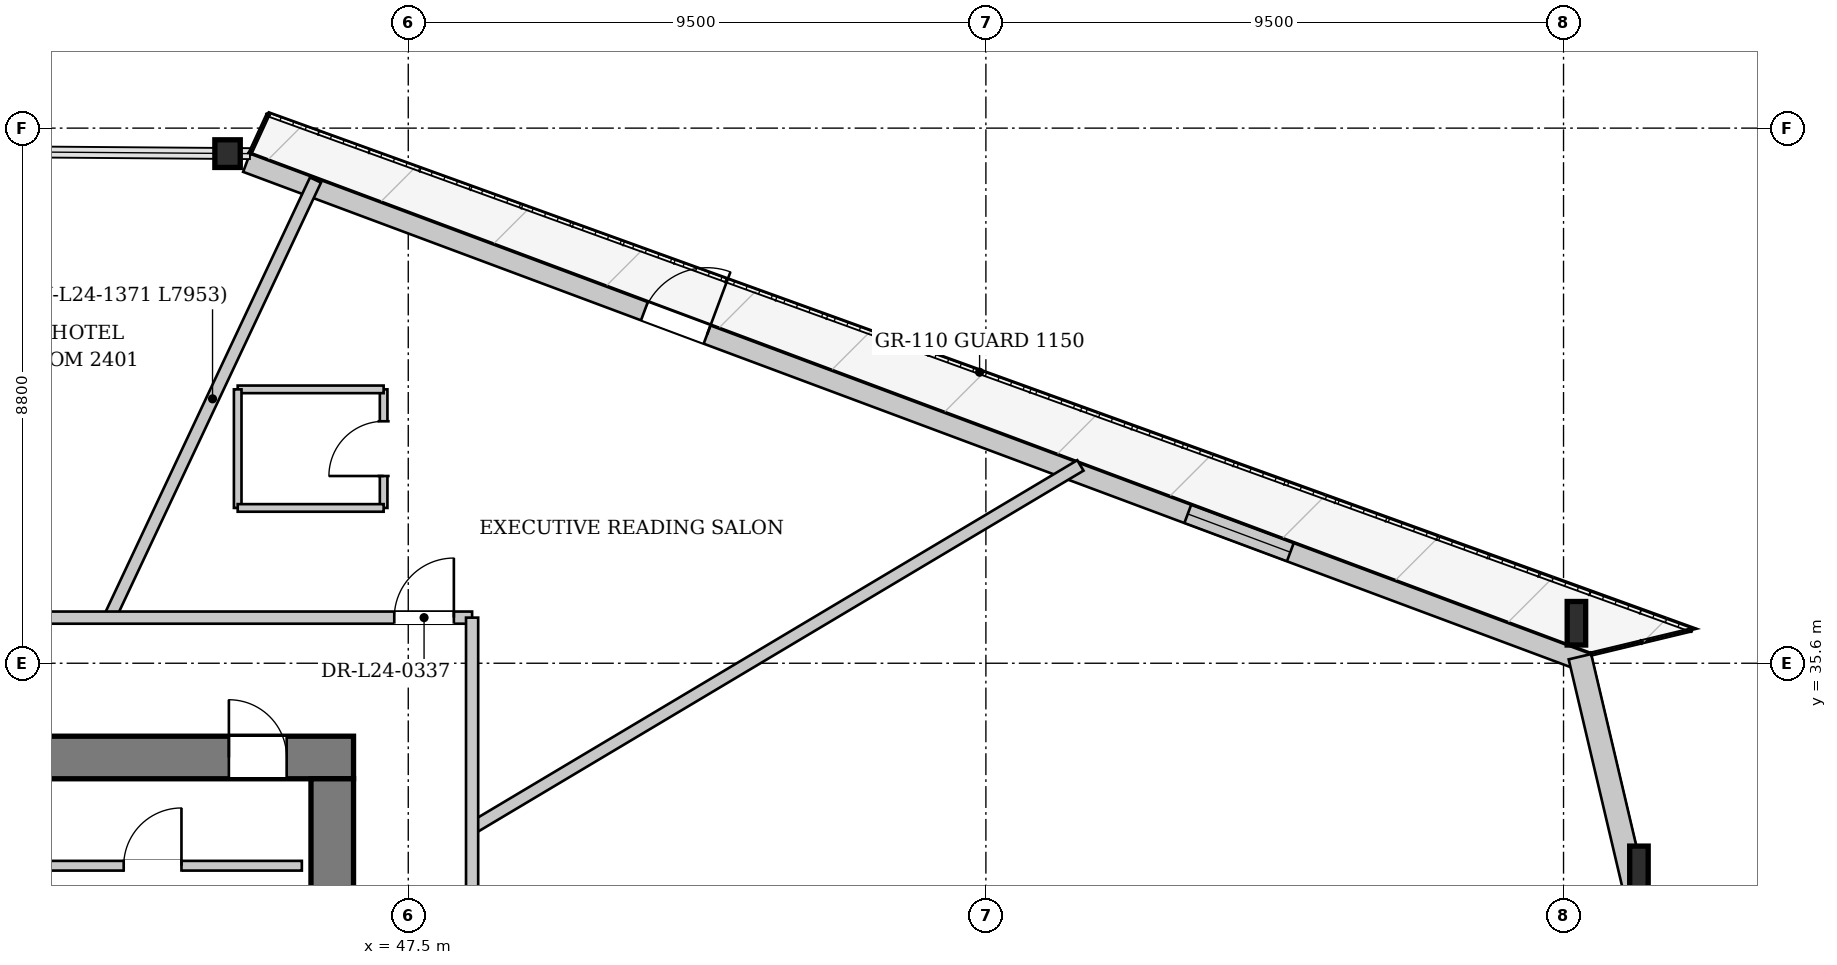
"""IFC4 building model, lengths in metres.
Left out: names, types, materials, properties, quantities, classifications, styles, units other than length and angle.
Written with IfcOpenShell. Run it as: python <this file> out.ifc"""

import sys

from ifc_helpers import new_model, si_unit, direction, frame, frame_2d, origin, origin_2d, place, context, subcontext, project, spatial, rectangle, i_section, extrude, source, transform, mapped, element, fill, save


model = new_model("IFC4")
c1 = context("Model", 3, precision=1e-05, world=origin(), true_north=direction((0.0, 1.0)))
c2 = subcontext(c1, "Body", "Model", "MODEL_VIEW")
j1 = project(units=[si_unit("LENGTHUNIT", "METRE"), si_unit("PLANEANGLEUNIT", "RADIAN")], contexts=[c1])
p1 = place(None, origin())
s1 = spatial("IfcSite", under=j1, at=p1, CompositionType="ELEMENT")
p2 = place(p1, origin())
s2 = spatial("IfcBuilding", under=s1, at=p2, CompositionType="ELEMENT")
p3 = place(p2, frame((0.0, 0.0, 95.05)))
s3 = spatial("IfcBuildingStorey", under=s2, at=p3, CompositionType="ELEMENT", Elevation=95.05)
m1 = source(origin(), c2, "Body", "SweptSolid", [
    extrude(i_section(OverallWidth=0.304, OverallDepth=0.716, WebThickness=0.021, FlangeThickness=0.04, at=origin_2d()), origin(), (0.0, 0.0, 1.0), 3.597),
])
p4 = place(p3, frame((67.919, 31.653, 0.0), z_axis=(-0.099696735978, 0.323454488545, 0.940977021332), x_axis=(-0.955635828254, -0.294550782985, 0.0)))
e1 = element("IfcColumn", 1, at=p4, inside=s3, PredefinedType="COLUMN", context=c2, shape_type="MappedRepresentation", body=[
    mapped(m1, transform((0.0, 0.0, 0.0), x_axis=(1.0, 0.0, 0.0), y_axis=(0.0, 1.0, 0.0), z_axis=(0.0, 0.0, 1.0), scale=1.0)),
])
m2 = source(origin(), c2, "Body", "SweptSolid", [
    extrude(i_section(OverallWidth=0.304, OverallDepth=0.716, WebThickness=0.021, FlangeThickness=0.04, at=origin_2d()), origin(), (0.0, 0.0, 1.0), 3.566),
])
p5 = place(p3, frame((66.954, 35.751, 0.0), z_axis=(-0.135884769408, 0.284023127593, 0.949139711757), x_axis=(-0.902075342607, -0.431578586424, 0.0)))
e2 = element("IfcColumn", 2, at=p5, inside=s3, PredefinedType="COLUMN", context=c2, shape_type="MappedRepresentation", body=[
    mapped(m2, transform((0.0, 0.0, 0.0), x_axis=(1.0, 0.0, 0.0), y_axis=(0.0, 1.0, 0.0), z_axis=(0.0, 0.0, 1.0), scale=1.0)),
])
m3 = source(origin(), c2, "Body", "SweptSolid", [
    extrude(i_section(OverallWidth=0.418, OverallDepth=0.455, WebThickness=0.038, FlangeThickness=0.059, at=origin_2d()), origin(), (0.0, 0.0, 1.0), 3.464),
])
p6 = place(p3, frame((44.896, 43.98, 0.0), z_axis=(-0.212555455601, 7.0475947e-05, 0.977149002623), x_axis=(-0.000331564969, -0.999999945032, 0.0)))
e3 = element("IfcColumn", 3, at=p6, inside=s3, PredefinedType="COLUMN", context=c2, shape_type="MappedRepresentation", body=[
    mapped(m3, transform((0.0, 0.0, 0.0), x_axis=(1.0, 0.0, 0.0), y_axis=(0.0, 1.0, 0.0), z_axis=(0.0, 0.0, 1.0), scale=1.0)),
])
p7 = place(p3, frame((44.84, 43.831, 0.0), z_axis=(0.0, 0.0, 1.0), x_axis=(0.936918509678, -0.349547859704, 0.0)))
e4 = element("IfcWall", 4, at=p7, inside=s3, PredefinedType="SOLIDWALL", context=c2, shape_type="SweptSolid", body=[
    extrude(rectangle(XDim=23.543, YDim=0.32, at=frame_2d((11.771, 0.0))), origin(), (0.0, 0.0, 1.0), 2.692),
])
p8 = place(p7, frame((6.984, 0.0, 0.0)))
e5 = element("IfcOpeningElement", 5, at=p8, cuts=e4, PredefinedType="OPENING", context=c2, shape_type="SweptSolid", body=[
    extrude(rectangle(XDim=1.1, YDim=2.3, at=frame_2d((0.55, 1.15))), frame((0.0, 0.17, 0.0), z_axis=(0.0, -1.0, 0.0), x_axis=(1.0, 0.0, 0.0)), (0.0, 0.0, 1.0), 0.34),
])
p9 = place(p7, frame((16.522, 0.0, 0.372)))
e6 = element("IfcOpeningElement", 6, at=p9, cuts=e4, PredefinedType="OPENING", context=c2, shape_type="SweptSolid", body=[
    extrude(rectangle(XDim=1.8, YDim=2.2, at=frame_2d((0.9, 1.1))), frame((0.0, 0.17, 0.0), z_axis=(0.0, -1.0, 0.0), x_axis=(1.0, 0.0, 0.0)), (0.0, 0.0, 1.0), 0.34),
])
p10 = place(p3, frame((66.77, 35.708, 0.0), z_axis=(0.0, 0.0, 1.0), x_axis=(0.229223557935, -0.973373803062, 0.0)))
e7 = element("IfcWall", 7, at=p10, inside=s3, PredefinedType="SOLIDWALL", context=c2, shape_type="SweptSolid", body=[
    extrude(rectangle(XDim=4.21, YDim=0.38, at=frame_2d((2.105, 0.0))), origin(), (0.0, 0.0, 1.0), 2.692),
])
p11 = place(p3, frame((29.4, 34.05, 0.0), z_axis=(0.0, 0.0, 1.0), x_axis=(1.0, 0.0, 0.0)))
e8 = element("IfcWall", 8, at=p11, inside=s3, PredefinedType="SHEAR", context=c2, shape_type="SweptSolid", body=[
    extrude(rectangle(XDim=17.2, YDim=0.7, at=frame_2d((8.6, 0.0))), origin(), (0.0, 0.0, 1.0), 3.3),
])
p12 = place(p11, frame((1.7, 0.0, 0.0)))
e9 = element("IfcOpeningElement", 9, at=p12, cuts=e8, PredefinedType="OPENING", context=c2, shape_type="SweptSolid", body=[
    extrude(rectangle(XDim=0.95, YDim=2.1, at=frame_2d((0.475, 1.05))), frame((0.0, 0.36, 0.0), z_axis=(0.0, -1.0, 0.0), x_axis=(1.0, 0.0, 0.0)), (0.0, 0.0, 1.0), 0.72),
])
p13 = place(p11, frame((4.08, 0.0, 0.0)))
e10 = element("IfcOpeningElement", 10, at=p13, cuts=e8, PredefinedType="OPENING", context=c2, shape_type="SweptSolid", body=[
    extrude(rectangle(XDim=1.32, YDim=2.2, at=frame_2d((0.66, 1.1))), frame((0.0, 0.36, 0.0), z_axis=(0.0, -1.0, 0.0), x_axis=(1.0, 0.0, 0.0)), (0.0, 0.0, 1.0), 0.72),
])
p14 = place(p11, frame((15.15, 0.0, 0.0)))
e11 = element("IfcOpeningElement", 11, at=p14, cuts=e8, PredefinedType="OPENING", context=c2, shape_type="SweptSolid", body=[
    extrude(rectangle(XDim=0.95, YDim=2.1, at=frame_2d((0.475, 1.05))), frame((0.0, 0.36, 0.0), z_axis=(0.0, -1.0, 0.0), x_axis=(1.0, 0.0, 0.0)), (0.0, 0.0, 1.0), 0.72),
])
p15 = place(p3, frame((46.25, 33.7, 0.0), z_axis=(0.0, 0.0, 1.0), x_axis=(0.0, -1.0, 0.0)))
e12 = element("IfcWall", 12, at=p15, inside=s3, PredefinedType="SHEAR", context=c2, shape_type="SweptSolid", body=[
    extrude(rectangle(XDim=14.2, YDim=0.7, at=frame_2d((7.1, 0.0))), origin(), (0.0, 0.0, 1.0), 3.3),
])
p16 = place(p15, frame((5.18, 0.0, 0.0)))
e13 = element("IfcOpeningElement", 13, at=p16, cuts=e12, PredefinedType="OPENING", context=c2, shape_type="SweptSolid", body=[
    extrude(rectangle(XDim=1.6, YDim=2.2, at=frame_2d((0.8, 1.1))), frame((0.0, 0.36, 0.0), z_axis=(0.0, -1.0, 0.0), x_axis=(1.0, 0.0, 0.0)), (0.0, 0.0, 1.0), 0.72),
])
p17 = place(p3, frame((40.72, 32.27, 0.0), z_axis=(0.0, 0.0, 1.0), x_axis=(1.0, 0.0, 0.0)))
e14 = element("IfcWall", 14, at=p17, inside=s3, PredefinedType="PARTITIONING", context=c2, shape_type="SweptSolid", body=[
    extrude(rectangle(XDim=5.03, YDim=0.16, at=frame_2d((2.515, 0.0))), origin(), (0.0, 0.0, 1.0), 3.3),
])
p18 = place(p17, frame((2.1, 0.0, 0.0)))
e15 = element("IfcOpeningElement", 15, at=p18, cuts=e14, PredefinedType="OPENING", context=c2, shape_type="SweptSolid", body=[
    extrude(rectangle(XDim=0.95, YDim=2.1, at=frame_2d((0.475, 1.05))), frame((0.0, 0.09, 0.0), z_axis=(0.0, -1.0, 0.0), x_axis=(1.0, 0.0, 0.0)), (0.0, 0.0, 1.0), 0.18),
])
p19 = place(p3, frame((42.588, 36.35, 0.0), z_axis=(0.0, 0.0, 1.0), x_axis=(0.425795558012, 0.904819397878, 0.0)))
e16 = element("IfcWall", 16, at=p19, inside=s3, PredefinedType="PARTITIONING", context=c2, shape_type="SweptSolid", body=[
    extrude(rectangle(XDim=7.953, YDim=0.2, at=frame_2d((3.977, 0.0))), origin(), (0.0, 0.0, 1.0), 3.3),
])
p20 = place(p3, frame((48.55, 32.889, 0.0), z_axis=(0.0, 0.0, 1.0), x_axis=(0.858967185963, 0.512030637208, 0.0)))
e17 = element("IfcWall", 17, at=p20, inside=s3, PredefinedType="PARTITIONING", context=c2, shape_type="SweptSolid", body=[
    extrude(rectangle(XDim=11.647, YDim=0.2, at=frame_2d((5.823, 0.0))), origin(), (0.0, 0.0, 1.0), 3.3),
])
p21 = place(p3, frame((47.095, 38.154, 0.0), z_axis=(0.0, 0.0, 1.0), x_axis=(0.0, 1.0, 0.0)))
e18 = element("IfcWall", 18, at=p21, inside=s3, PredefinedType="PARTITIONING", context=c2, shape_type="SweptSolid", body=[
    extrude(rectangle(XDim=1.95, YDim=0.125, at=frame_2d((0.975, 0.0))), origin(), (0.0, 0.0, 1.0), 3.3),
])
p22 = place(p21, frame((0.525, 0.0, 0.0)))
e19 = element("IfcOpeningElement", 19, at=p22, cuts=e18, PredefinedType="OPENING", context=c2, shape_type="SweptSolid", body=[
    extrude(rectangle(XDim=0.9, YDim=2.1, at=frame_2d((0.45, 1.05))), frame((0.0, 0.073, 0.0), z_axis=(0.0, -1.0, 0.0), x_axis=(1.0, 0.0, 0.0)), (0.0, 0.0, 1.0), 0.145),
])
p23 = place(p3, frame((47.095, 40.104, 0.0), z_axis=(0.0, 0.0, 1.0), x_axis=(-1.0, 0.0, 0.0)))
e20 = element("IfcWall", 20, at=p23, inside=s3, PredefinedType="PARTITIONING", context=c2, shape_type="SweptSolid", body=[
    extrude(rectangle(XDim=2.4, YDim=0.125, at=frame_2d((1.2, 0.0))), origin(), (0.0, 0.0, 1.0), 3.3),
])
p24 = place(p3, frame((44.695, 40.104, 0.0), z_axis=(0.0, 0.0, 1.0), x_axis=(0.0, -1.0, 0.0)))
e21 = element("IfcWall", 21, at=p24, inside=s3, PredefinedType="PARTITIONING", context=c2, shape_type="SweptSolid", body=[
    extrude(rectangle(XDim=1.95, YDim=0.125, at=frame_2d((0.975, 0.0))), origin(), (0.0, 0.0, 1.0), 3.3),
])
p25 = place(p3, frame((44.695, 38.154, 0.0), z_axis=(0.0, 0.0, 1.0), x_axis=(1.0, 0.0, 0.0)))
e22 = element("IfcWall", 22, at=p25, inside=s3, PredefinedType="PARTITIONING", context=c2, shape_type="SweptSolid", body=[
    extrude(rectangle(XDim=2.4, YDim=0.125, at=frame_2d((1.2, 0.0))), origin(), (0.0, 0.0, 1.0), 2.985),
])
p26 = place(p3, frame((27.45, 36.35, 0.0), z_axis=(0.0, 0.0, 1.0), x_axis=(1.0, 0.0, 0.0)))
e23 = element("IfcWall", 23, at=p26, inside=s3, PredefinedType="PARTITIONING", context=c2, shape_type="SweptSolid", body=[
    extrude(rectangle(XDim=21.1, YDim=0.2, at=frame_2d((10.55, 0.0))), origin(), (0.0, 0.0, 1.0), 3.3),
])
p27 = place(p26, frame((11.722, 0.0, 0.0)))
e24 = element("IfcOpeningElement", 24, at=p27, cuts=e23, PredefinedType="OPENING", context=c2, shape_type="SweptSolid", body=[
    extrude(rectangle(XDim=0.98, YDim=2.15, at=frame_2d((0.49, 1.075))), frame((0.0, 0.11, 0.0), z_axis=(0.0, -1.0, 0.0), x_axis=(1.0, 0.0, 0.0)), (0.0, 0.0, 1.0), 0.22),
])
p28 = place(p26, frame((1.25, 0.0, 0.0)))
e25 = element("IfcOpeningElement", 25, at=p28, cuts=e23, PredefinedType="OPENING", context=c2, shape_type="SweptSolid", body=[
    extrude(rectangle(XDim=0.98, YDim=2.15, at=frame_2d((0.49, 1.075))), frame((0.0, 0.11, 0.0), z_axis=(0.0, -1.0, 0.0), x_axis=(1.0, 0.0, 0.0)), (0.0, 0.0, 1.0), 0.22),
])
p29 = place(p26, frame((19.82, 0.0, 0.0)))
e26 = element("IfcOpeningElement", 26, at=p29, cuts=e23, PredefinedType="OPENING", context=c2, shape_type="SweptSolid", body=[
    extrude(rectangle(XDim=0.98, YDim=2.15, at=frame_2d((0.49, 1.075))), frame((0.0, 0.11, 0.0), z_axis=(0.0, -1.0, 0.0), x_axis=(1.0, 0.0, 0.0)), (0.0, 0.0, 1.0), 0.22),
])
p30 = place(p3, frame((48.55, 16.85, 0.0), z_axis=(0.0, 0.0, 1.0), x_axis=(0.0, 1.0, 0.0)))
e27 = element("IfcWall", 27, at=p30, inside=s3, PredefinedType="PARTITIONING", context=c2, shape_type="SweptSolid", body=[
    extrude(rectangle(XDim=19.5, YDim=0.2, at=frame_2d((9.75, 0.0))), origin(), (0.0, 0.0, 1.0), 3.3),
])
p31 = place(p30, frame((3.35, 0.0, 0.0)))
e28 = element("IfcOpeningElement", 28, at=p31, cuts=e27, PredefinedType="OPENING", context=c2, shape_type="SweptSolid", body=[
    extrude(rectangle(XDim=0.98, YDim=2.15, at=frame_2d((0.49, 1.075))), frame((0.0, 0.11, 0.0), z_axis=(0.0, -1.0, 0.0), x_axis=(1.0, 0.0, 0.0)), (0.0, 0.0, 1.0), 0.22),
])
p32 = place(p30, frame((11.352, 0.0, 0.0)))
e29 = element("IfcOpeningElement", 29, at=p32, cuts=e27, PredefinedType="OPENING", context=c2, shape_type="SweptSolid", body=[
    extrude(rectangle(XDim=0.98, YDim=2.15, at=frame_2d((0.49, 1.075))), frame((0.0, 0.11, 0.0), z_axis=(0.0, -1.0, 0.0), x_axis=(1.0, 0.0, 0.0)), (0.0, 0.0, 1.0), 0.22),
])
m4 = source(origin(), c2, "Body", "SweptSolid", [
    extrude(rectangle(XDim=1.1, YDim=2.3, at=frame_2d((0.55, 1.15))), frame((0.0, 0.025, 0.0), z_axis=(0.0, -1.0, 0.0), x_axis=(1.0, 0.0, 0.0)), (0.0, 0.0, 1.0), 0.05),
])
p33 = place(p8, origin())
e30 = element("IfcDoor", 30, at=p33, inside=s3, OperationType="SINGLE_SWING_RIGHT", PredefinedType="DOOR", context=c2, shape_type="MappedRepresentation", body=[
    mapped(m4, transform((0.0, 0.0, 0.0), x_axis=(1.0, 0.0, 0.0), y_axis=(0.0, 1.0, 0.0), z_axis=(0.0, 0.0, 1.0), scale=1.0)),
])
fill(e5, e30)
m5 = source(origin(), c2, "Body", "SweptSolid", [
    extrude(rectangle(XDim=1.8, YDim=2.2, at=frame_2d((0.9, 1.1))), frame((0.0, 0.03, 0.0), z_axis=(0.0, -1.0, 0.0), x_axis=(1.0, 0.0, 0.0)), (0.0, 0.0, 1.0), 0.06),
])
p34 = place(p9, origin())
e31 = element("IfcWindow", 31, at=p34, inside=s3, PartitioningType="SINGLE_PANEL", PredefinedType="WINDOW", context=c2, shape_type="MappedRepresentation", body=[
    mapped(m5, transform((0.0, 0.0, 0.0), x_axis=(1.0, 0.0, 0.0), y_axis=(0.0, 1.0, 0.0), z_axis=(0.0, 0.0, 1.0), scale=1.0)),
])
fill(e6, e31)
m6 = source(origin(), c2, "Body", "SweptSolid", [
    extrude(rectangle(XDim=0.95, YDim=2.1, at=frame_2d((0.475, 1.05))), frame((0.0, 0.025, 0.0), z_axis=(0.0, -1.0, 0.0), x_axis=(1.0, 0.0, 0.0)), (0.0, 0.0, 1.0), 0.05),
])
p35 = place(p18, origin())
e32 = element("IfcDoor", 32, at=p35, inside=s3, OperationType="SINGLE_SWING_RIGHT", PredefinedType="DOOR", context=c2, shape_type="MappedRepresentation", body=[
    mapped(m6, transform((0.0, 0.0, 0.0), x_axis=(1.0, 0.0, 0.0), y_axis=(0.0, 1.0, 0.0), z_axis=(0.0, 0.0, 1.0), scale=1.0)),
])
fill(e15, e32)
p36 = place(p14, origin())
e33 = element("IfcDoor", 33, at=p36, inside=s3, OperationType="SINGLE_SWING_LEFT", PredefinedType="DOOR", context=c2, shape_type="MappedRepresentation", body=[
    mapped(m6, transform((0.0, 0.0, 0.0), x_axis=(1.0, 0.0, 0.0), y_axis=(0.0, 1.0, 0.0), z_axis=(0.0, 0.0, 1.0), scale=1.0)),
])
fill(e11, e33)
m7 = source(origin(), c2, "Body", "SweptSolid", [
    extrude(rectangle(XDim=0.9, YDim=2.1, at=frame_2d((0.45, 1.05))), frame((0.0, 0.025, 0.0), z_axis=(0.0, -1.0, 0.0), x_axis=(1.0, 0.0, 0.0)), (0.0, 0.0, 1.0), 0.05),
])
p37 = place(p22, origin())
e34 = element("IfcDoor", 34, at=p37, inside=s3, OperationType="SINGLE_SWING_LEFT", PredefinedType="DOOR", context=c2, shape_type="MappedRepresentation", body=[
    mapped(m7, transform((0.0, 0.0, 0.0), x_axis=(1.0, 0.0, 0.0), y_axis=(0.0, 1.0, 0.0), z_axis=(0.0, 0.0, 1.0), scale=1.0)),
])
fill(e19, e34)
m8 = source(origin(), c2, "Body", "SweptSolid", [
    extrude(rectangle(XDim=0.98, YDim=2.15, at=frame_2d((0.49, 1.075))), frame((0.0, 0.025, 0.0), z_axis=(0.0, -1.0, 0.0), x_axis=(1.0, 0.0, 0.0)), (0.0, 0.0, 1.0), 0.05),
])
p38 = place(p29, origin())
e35 = element("IfcDoor", 35, at=p38, inside=s3, OperationType="SINGLE_SWING_RIGHT", PredefinedType="DOOR", context=c2, shape_type="MappedRepresentation", body=[
    mapped(m8, transform((0.0, 0.0, 0.0), x_axis=(1.0, 0.0, 0.0), y_axis=(0.0, 1.0, 0.0), z_axis=(0.0, 0.0, 1.0), scale=1.0)),
])
fill(e26, e35)
save(model, sys.argv[1])
